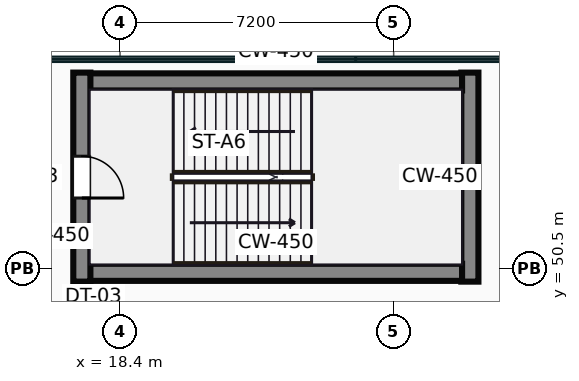
"""IFC4 building model, lengths in metres.
Left out: names, types, materials, properties, quantities, classifications, styles, units other than length and angle.
Written with IfcOpenShell. Run it as: python <this file> out.ifc"""

import sys

from ifc_helpers import new_model, si_unit, direction, frame, frame_2d, origin, place, context, subcontext, project, spatial, rectangle, extrude, source, transform, mapped, element, fill, save


model = new_model("IFC4")
c1 = context("Model", 3, precision=1e-05, world=origin(), true_north=direction((0.0, 1.0)))
c2 = subcontext(c1, "Body", "Model", "MODEL_VIEW")
j1 = project(units=[si_unit("LENGTHUNIT", "METRE"), si_unit("PLANEANGLEUNIT", "RADIAN")], contexts=[c1])
p1 = place(None, origin())
s1 = spatial("IfcSite", under=j1, at=p1, CompositionType="ELEMENT")
p2 = place(p1, origin())
s2 = spatial("IfcBuilding", under=s1, at=p2, CompositionType="ELEMENT")
p3 = place(p2, frame((0.0, 0.0, 11.0)))
s3 = spatial("IfcBuildingStorey", under=s2, at=p3, CompositionType="ELEMENT", Elevation=11.0)
m1 = source(origin(), c2, "Body", "SweptSolid", [
    extrude(rectangle(XDim=5.5, YDim=0.45, at=frame_2d((2.75, 0.0))), origin(), (0.0, 0.0, 1.0), 5.0),
])
p4 = place(p3, frame((17.395, 50.15, 0.0), z_axis=(0.0, 0.0, 1.0), x_axis=(0.0, 1.0, 0.0)))
e1 = element("IfcWall", 1, at=p4, inside=s3, PredefinedType="SHEAR", context=c2, shape_type="MappedRepresentation", body=[
    mapped(m1, transform((0.0, 0.0, 0.0))),
])
p5 = place(p4, frame((2.2, 0.0, 0.0)))
e2 = element("IfcOpeningElement", 2, at=p5, cuts=e1, PredefinedType="OPENING", context=c2, shape_type="SweptSolid", body=[
    extrude(rectangle(XDim=1.1, YDim=2.15, at=frame_2d((0.55, 1.075))), frame((0.0, 0.235, 0.0), z_axis=(0.0, -1.0, 0.0), x_axis=(1.0, 0.0, 0.0)), (0.0, 0.0, 1.0), 0.47),
])
m2 = source(origin(), c2, "Body", "SweptSolid", [
    extrude(rectangle(XDim=9.8, YDim=0.45, at=frame_2d((4.9, 0.0))), origin(), (0.0, 0.0, 1.0), 5.0),
])
for number, where, z_axis, x_axis in (
    (3, (17.6, 50.395, 0.0), (0.0, 0.0, 1.0), (1.0, 0.0, 0.0)),
    (4, (17.6, 55.405, 0.0), (0.0, 0.0, 1.0), (1.0, 0.0, 0.0)),
):
    element("IfcWall", number, at=place(p3, frame(where, z_axis=z_axis, x_axis=x_axis)), inside=s3, PredefinedType="SHEAR", context=c2, shape_type="MappedRepresentation", body=[
        mapped(m2, transform((0.0, 0.0, 0.0))),
    ])
p6 = place(p3, frame((27.605, 50.15, 0.0), z_axis=(0.0, 0.0, 1.0), x_axis=(0.0, 1.0, 0.0)))
e5 = element("IfcWall", 5, at=p6, inside=s3, PredefinedType="SHEAR", context=c2, shape_type="MappedRepresentation", body=[
    mapped(m1, transform((0.0, 0.0, 0.0))),
])
m3 = source(origin(), c2, "Body", "SweptSolid", [
    extrude(rectangle(XDim=1.1, YDim=2.15, at=frame_2d((0.55, 1.075))), frame((0.0, 0.025, 0.0), z_axis=(0.0, -1.0, 0.0), x_axis=(1.0, 0.0, 0.0)), (0.0, 0.0, 1.0), 0.05),
])
p7 = place(p5, frame((1.1, 0.0, 0.0), z_axis=(0.0, 0.0, 1.0), x_axis=(-1.0, 0.0, 0.0)))
e6 = element("IfcDoor", 6, at=p7, inside=s3, OperationType="SINGLE_SWING_LEFT", PredefinedType="DOOR", context=c2, shape_type="MappedRepresentation", body=[
    mapped(m3, transform((0.0, 0.0, 0.0))),
])
fill(e2, e6)
save(model, sys.argv[1])
